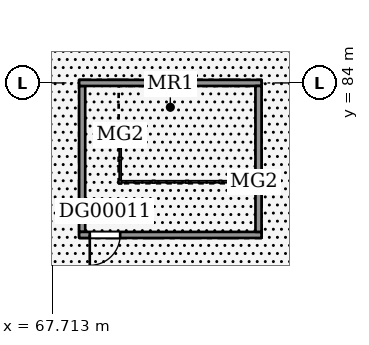
"""IFC4 building model, lengths in metres.
Left out: names, types, materials, properties, quantities, classifications, styles, units other than length and angle.
Written with IfcOpenShell. Run it as: python <this file> out.ifc"""

import sys

from ifc_helpers import new_model, si_unit, direction, frame, frame_2d, origin, place, context, subcontext, project, spatial, rectangle, extrude, element, fill, save


model = new_model("IFC4")
c1 = context("Model", 3, precision=1e-05, world=origin(), true_north=direction((0.0, 1.0)))
c2 = subcontext(c1, "Body", "Model", "MODEL_VIEW")
j1 = project(units=[si_unit("LENGTHUNIT", "METRE"), si_unit("PLANEANGLEUNIT", "RADIAN")], contexts=[c1])
p1 = place(None, origin())
s1 = spatial("IfcSite", under=j1, at=p1, CompositionType="ELEMENT")
p2 = place(p1, origin())
s2 = spatial("IfcBuilding", under=s1, at=p2, CompositionType="ELEMENT")
p3 = place(p2, origin())
s3 = spatial("IfcBuildingStorey", under=s2, at=p3, CompositionType="ELEMENT", Elevation=0.0)
p4 = place(p3, frame((68.7, 79.1, 0.0), z_axis=(0.0, 0.0, 1.0), x_axis=(0.0, 1.0, 0.0)))
e1 = element("IfcWall", 1, at=p4, inside=s3, PredefinedType="SOLIDWALL", context=c2, shape_type="SweptSolid", body=[
    extrude(rectangle(XDim=4.8, YDim=0.2, at=frame_2d((2.4, 0.0))), origin(), (0.0, 0.0, 1.0), 3.6),
])
p5 = place(p3, frame((68.6, 79.0, 0.0), z_axis=(0.0, 0.0, 1.0), x_axis=(1.0, 0.0, 0.0)))
e2 = element("IfcWall", 2, at=p5, inside=s3, PredefinedType="SOLIDWALL", context=c2, shape_type="SweptSolid", body=[
    extrude(rectangle(XDim=6.0, YDim=0.2, at=frame_2d((3.0, 0.0))), origin(), (0.0, 0.0, 1.0), 3.6),
])
p6 = place(p5, frame((0.35, 0.0, 0.0)))
e3 = element("IfcOpeningElement", 3, at=p6, cuts=e2, PredefinedType="OPENING", context=c2, shape_type="SweptSolid", body=[
    extrude(rectangle(XDim=1.0, YDim=2.1, at=frame_2d((0.5, 1.05))), frame((0.0, 0.11, 0.0), z_axis=(0.0, -1.0, 0.0), x_axis=(1.0, 0.0, 0.0)), (0.0, 0.0, 1.0), 0.22),
])
p7 = place(p3, frame((68.6, 84.0, 0.0), z_axis=(0.0, 0.0, 1.0), x_axis=(1.0, 0.0, 0.0)))
e4 = element("IfcWall", 4, at=p7, inside=s3, PredefinedType="SOLIDWALL", context=c2, shape_type="SweptSolid", body=[
    extrude(rectangle(XDim=6.0, YDim=0.2, at=frame_2d((3.0, 0.0))), origin(), (0.0, 0.0, 1.0), 3.6),
])
p8 = place(p3, frame((74.5, 79.1, 0.0), z_axis=(0.0, 0.0, 1.0), x_axis=(0.0, 1.0, 0.0)))
e5 = element("IfcWall", 5, at=p8, inside=s3, PredefinedType="SOLIDWALL", context=c2, shape_type="SweptSolid", body=[
    extrude(rectangle(XDim=4.8, YDim=0.2, at=frame_2d((2.4, 0.0))), origin(), (0.0, 0.0, 1.0), 3.6),
])
p9 = place(p6, frame((1.0, 0.0, 0.0), z_axis=(0.0, 0.0, 1.0), x_axis=(-1.0, 0.0, 0.0)))
e6 = element("IfcDoor", 6, at=p9, inside=s3, OperationType="SINGLE_SWING_RIGHT", PredefinedType="DOOR", context=c2, shape_type="SweptSolid", body=[
    extrude(rectangle(XDim=1.0, YDim=2.1, at=frame_2d((0.5, 1.05))), frame((0.0, 0.025, 0.0), z_axis=(0.0, -1.0, 0.0), x_axis=(1.0, 0.0, 0.0)), (0.0, 0.0, 1.0), 0.05),
])
fill(e3, e6)
save(model, sys.argv[1])
